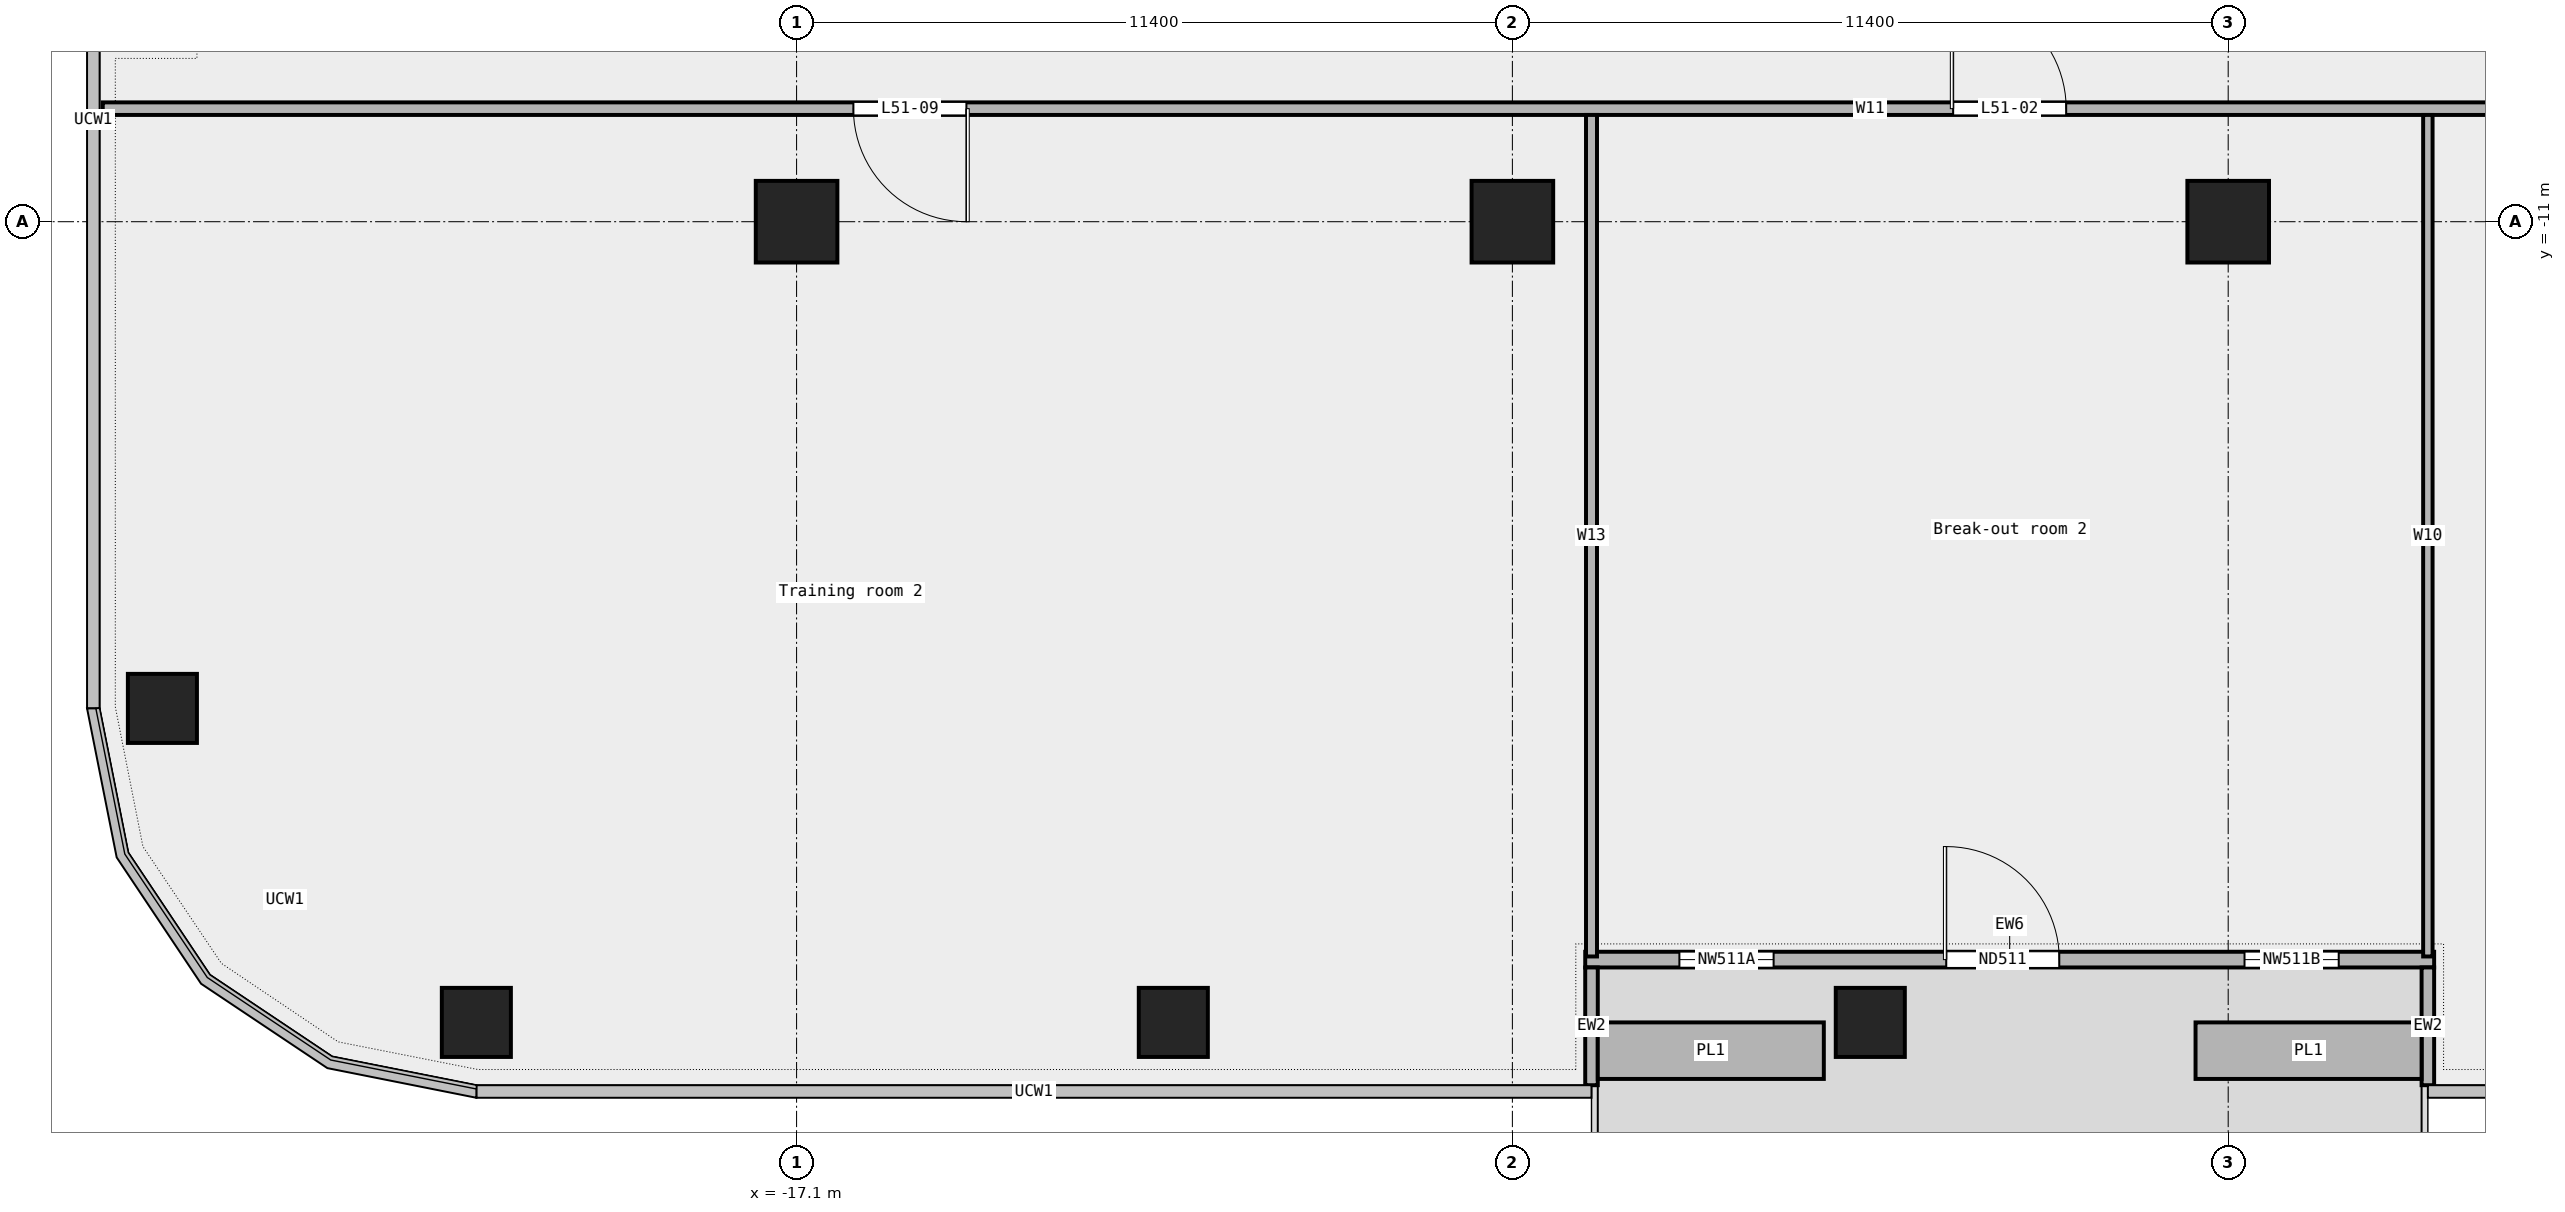
"""IFC4 building model, lengths in metres.
Left out: names, types, materials, properties, quantities, classifications, styles, units other than length and angle.
Written with IfcOpenShell. Run it as: python <this file> out.ifc"""

import sys

from ifc_helpers import new_model, si_unit, direction, frame, frame_2d, origin, origin_2d, place, context, subcontext, project, spatial, rectangle, extrude, element, fill, save


model = new_model("IFC4")
c1 = context("Model", 3, precision=1e-05, world=origin(), true_north=direction((0.0, 1.0)))
c2 = subcontext(c1, "Body", "Model", "MODEL_VIEW")
j1 = project(units=[si_unit("LENGTHUNIT", "METRE"), si_unit("PLANEANGLEUNIT", "RADIAN")], contexts=[c1])
p1 = place(None, origin())
s1 = spatial("IfcSite", under=j1, at=p1, CompositionType="ELEMENT")
p2 = place(p1, origin())
s2 = spatial("IfcBuilding", under=s1, at=p2, CompositionType="ELEMENT")
p3 = place(p2, frame((0.0, 0.0, 239.0)))
s3 = spatial("IfcBuildingStorey", under=s2, at=p3, CompositionType="ELEMENT", Elevation=239.0)
for number, where, z_axis, x_axis in (
    (1, (-22.2, -23.75, 0.0), (0.0, 0.0, 1.0), (1.0, 0.0, 0.0)),
    (2, (-11.1, -23.75, 0.0), (0.0, 0.0, 1.0), (1.0, 0.0, 0.0)),
    (3, (0.0, -23.75, 0.0), (0.0, 0.0, 1.0), (1.0, 0.0, 0.0)),
    (4, (-27.2, -18.75, 0.0), (0.0, 0.0, 1.0), (1.0, 0.0, 0.0)),
):
    element("IfcColumn", number, at=place(p3, frame(where, z_axis=z_axis, x_axis=x_axis)), inside=s3, PredefinedType="COLUMN", context=c2, shape_type="SweptSolid", body=[
        extrude(rectangle(XDim=1.1, YDim=1.1, at=origin_2d()), origin(), (0.0, 0.0, 1.0), 3.6),
    ])
for number, where, z_axis, x_axis in (
    (5, (-17.1, -11.0, 0.0), (0.0, 0.0, 1.0), (1.0, 0.0, 0.0)),
    (6, (-5.7, -11.0, 0.0), (0.0, 0.0, 1.0), (1.0, 0.0, 0.0)),
    (7, (5.7, -11.0, 0.0), (0.0, 0.0, 1.0), (1.0, 0.0, 0.0)),
):
    element("IfcColumn", number, at=place(p3, frame(where, z_axis=z_axis, x_axis=x_axis)), inside=s3, PredefinedType="COLUMN", context=c2, shape_type="SweptSolid", body=[
        extrude(rectangle(XDim=1.3, YDim=1.3, at=origin_2d()), origin(), (0.0, 0.0, 1.0), 3.6),
    ])
p4 = place(p3, frame((-4.54, -22.75, 0.0), z_axis=(0.0, 0.0, 1.0), x_axis=(1.0, 0.0, 0.0)))
e8 = element("IfcWall", 8, at=p4, inside=s3, PredefinedType="STANDARD", context=c2, shape_type="SweptSolid", body=[
    extrude(rectangle(XDim=13.52, YDim=0.25, at=frame_2d((6.76, 0.0))), origin(), (0.0, 0.0, 1.0), 3.6),
])
p5 = place(p4, frame((1.5, 0.0, 0.45)))
e9 = element("IfcOpeningElement", 9, at=p5, cuts=e8, PredefinedType="OPENING", context=c2, shape_type="SweptSolid", body=[
    extrude(rectangle(XDim=1.5, YDim=2.4, at=frame_2d((0.75, 1.2))), frame((0.0, 0.137, 0.0), z_axis=(0.0, -1.0, 0.0), x_axis=(1.0, 0.0, 0.0)), (0.0, 0.0, 1.0), 0.274),
])
p6 = place(p4, frame((5.75, 0.0, 0.0)))
e10 = element("IfcOpeningElement", 10, at=p6, cuts=e8, PredefinedType="OPENING", context=c2, shape_type="SweptSolid", body=[
    extrude(rectangle(XDim=1.8, YDim=2.4, at=frame_2d((0.9, 1.2))), frame((0.0, 0.137, 0.0), z_axis=(0.0, -1.0, 0.0), x_axis=(1.0, 0.0, 0.0)), (0.0, 0.0, 1.0), 0.274),
])
p7 = place(p4, frame((10.5, 0.0, 0.45)))
e11 = element("IfcOpeningElement", 11, at=p7, cuts=e8, PredefinedType="OPENING", context=c2, shape_type="SweptSolid", body=[
    extrude(rectangle(XDim=1.5, YDim=2.4, at=frame_2d((0.75, 1.2))), frame((0.0, 0.137, 0.0), z_axis=(0.0, -1.0, 0.0), x_axis=(1.0, 0.0, 0.0)), (0.0, 0.0, 1.0), 0.274),
])
for number, where, z_axis, x_axis in (
    (12, (-4.44, -24.75, 0.0), (0.0, 0.0, 1.0), (0.0, 1.0, 0.0)),
    (13, (8.88, -24.75, 0.0), (0.0, 0.0, 1.0), (0.0, 1.0, 0.0)),
):
    element("IfcWall", number, at=place(p3, frame(where, z_axis=z_axis, x_axis=x_axis)), inside=s3, PredefinedType="STANDARD", context=c2, shape_type="SweptSolid", body=[
        extrude(rectangle(XDim=1.875, YDim=0.2, at=frame_2d((0.938, 0.0))), origin(), (0.0, 0.0, 1.0), 3.6),
    ])
for number, where, z_axis, x_axis in (
    (14, (-4.34, -24.2, 0.0), (0.0, 0.0, 1.0), (1.0, 0.0, 0.0)),
    (15, (5.18, -24.2, 0.0), (0.0, 0.0, 1.0), (1.0, 0.0, 0.0)),
):
    element("IfcWall", number, at=place(p3, frame(where, z_axis=z_axis, x_axis=x_axis)), inside=s3, PredefinedType="STANDARD", context=c2, shape_type="SweptSolid", body=[
        extrude(rectangle(XDim=3.6, YDim=0.9, at=frame_2d((1.8, 0.0))), origin(), (0.0, 0.0, 1.0), 0.7),
    ])
p8 = place(p3, frame((-28.15, -9.2, 0.0), z_axis=(0.0, 0.0, 1.0), x_axis=(1.0, 0.0, 0.0)))
e16 = element("IfcWall", 16, at=p8, inside=s3, PredefinedType="PARTITIONING", context=c2, shape_type="SweptSolid", body=[
    extrude(rectangle(XDim=56.3, YDim=0.2, at=frame_2d((28.15, 0.0))), origin(), (0.0, 0.0, 1.0), 3.6),
])
p9 = place(p8, frame((29.47, 0.0, 0.0)))
e17 = element("IfcOpeningElement", 17, at=p9, cuts=e16, PredefinedType="OPENING", context=c2, shape_type="SweptSolid", body=[
    extrude(rectangle(XDim=1.8, YDim=2.1, at=frame_2d((0.9, 1.05))), frame((0.0, 0.112, 0.0), z_axis=(0.0, -1.0, 0.0), x_axis=(1.0, 0.0, 0.0)), (0.0, 0.0, 1.0), 0.224),
])
p10 = place(p8, frame((45.965, 0.0, 0.0)))
e18 = element("IfcOpeningElement", 18, at=p10, cuts=e16, PredefinedType="OPENING", context=c2, shape_type="SweptSolid", body=[
    extrude(rectangle(XDim=1.8, YDim=2.1, at=frame_2d((0.9, 1.05))), frame((0.0, 0.112, 0.0), z_axis=(0.0, -1.0, 0.0), x_axis=(1.0, 0.0, 0.0)), (0.0, 0.0, 1.0), 0.224),
])
p11 = place(p8, frame((11.955, 0.0, 0.0)))
e19 = element("IfcOpeningElement", 19, at=p11, cuts=e16, PredefinedType="OPENING", context=c2, shape_type="SweptSolid", body=[
    extrude(rectangle(XDim=1.8, YDim=2.1, at=frame_2d((0.9, 1.05))), frame((0.0, 0.112, 0.0), z_axis=(0.0, -1.0, 0.0), x_axis=(1.0, 0.0, 0.0)), (0.0, 0.0, 1.0), 0.224),
])
p12 = place(p3, frame((-4.44, -22.7, 0.0), z_axis=(0.0, 0.0, 1.0), x_axis=(0.0, 1.0, 0.0)))
e20 = element("IfcWall", 20, at=p12, inside=s3, PredefinedType="PARTITIONING", context=c2, shape_type="SweptSolid", body=[
    extrude(rectangle(XDim=13.4, YDim=0.175, at=frame_2d((6.7, 0.0))), origin(), (0.0, 0.0, 1.0), 3.6),
])
p13 = place(p3, frame((8.88, -22.7, 0.0), z_axis=(0.0, 0.0, 1.0), x_axis=(0.0, 1.0, 0.0)))
e21 = element("IfcWall", 21, at=p13, inside=s3, PredefinedType="PARTITIONING", context=c2, shape_type="SweptSolid", body=[
    extrude(rectangle(XDim=13.4, YDim=0.15, at=frame_2d((6.7, 0.0))), origin(), (0.0, 0.0, 1.0), 3.6),
])
p14 = place(p5, origin())
e22 = element("IfcWindow", 22, at=p14, inside=s3, PartitioningType="SINGLE_PANEL", PredefinedType="WINDOW", context=c2, shape_type="SweptSolid", body=[
    extrude(rectangle(XDim=1.5, YDim=2.4, at=frame_2d((0.75, 1.2))), frame((0.0, 0.03, 0.0), z_axis=(0.0, -1.0, 0.0), x_axis=(1.0, 0.0, 0.0)), (0.0, 0.0, 1.0), 0.06),
])
fill(e9, e22)
p15 = place(p6, origin())
e23 = element("IfcDoor", 23, at=p15, inside=s3, OperationType="DOUBLE_DOOR_SINGLE_SWING", PredefinedType="DOOR", context=c2, shape_type="SweptSolid", body=[
    extrude(rectangle(XDim=1.8, YDim=2.4, at=frame_2d((0.9, 1.2))), frame((0.0, 0.025, 0.0), z_axis=(0.0, -1.0, 0.0), x_axis=(1.0, 0.0, 0.0)), (0.0, 0.0, 1.0), 0.05),
])
fill(e10, e23)
p16 = place(p7, origin())
e24 = element("IfcWindow", 24, at=p16, inside=s3, PartitioningType="SINGLE_PANEL", PredefinedType="WINDOW", context=c2, shape_type="SweptSolid", body=[
    extrude(rectangle(XDim=1.5, YDim=2.4, at=frame_2d((0.75, 1.2))), frame((0.0, 0.03, 0.0), z_axis=(0.0, -1.0, 0.0), x_axis=(1.0, 0.0, 0.0)), (0.0, 0.0, 1.0), 0.06),
])
fill(e11, e24)
p17 = place(p9, origin())
e25 = element("IfcDoor", 25, at=p17, inside=s3, OperationType="DOUBLE_DOOR_SINGLE_SWING", PredefinedType="DOOR", context=c2, shape_type="SweptSolid", body=[
    extrude(rectangle(XDim=1.8, YDim=2.1, at=frame_2d((0.9, 1.05))), frame((0.0, 0.025, 0.0), z_axis=(0.0, -1.0, 0.0), x_axis=(1.0, 0.0, 0.0)), (0.0, 0.0, 1.0), 0.05),
])
fill(e17, e25)
p18 = place(p11, origin())
e26 = element("IfcDoor", 26, at=p18, inside=s3, OperationType="DOUBLE_DOOR_SINGLE_SWING", PredefinedType="DOOR", context=c2, shape_type="SweptSolid", body=[
    extrude(rectangle(XDim=1.8, YDim=2.1, at=frame_2d((0.9, 1.05))), frame((0.0, 0.025, 0.0), z_axis=(0.0, -1.0, 0.0), x_axis=(1.0, 0.0, 0.0)), (0.0, 0.0, 1.0), 0.05),
])
fill(e19, e26)
save(model, sys.argv[1])
